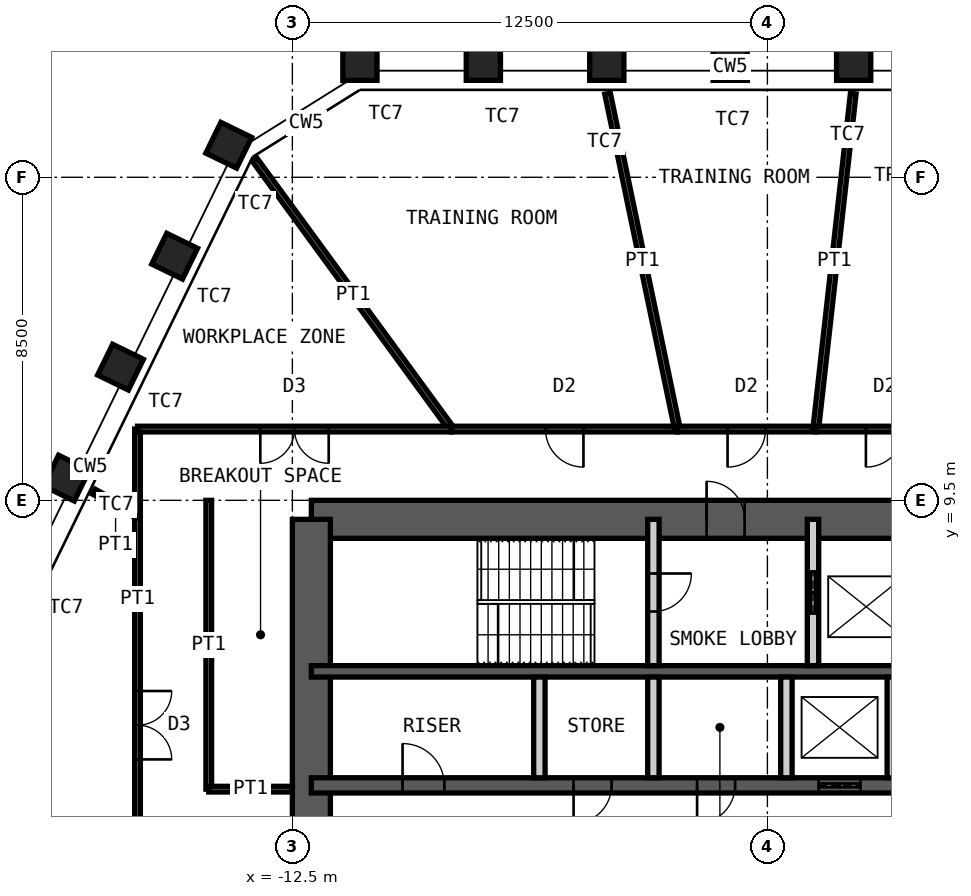
"""IFC4 building model, lengths in metres.
Left out: names, types, materials, properties, quantities, classifications, styles, units other than length and angle.
Written with IfcOpenShell. Run it as: python <this file> out.ifc"""

import sys

from ifc_helpers import new_model, si_unit, direction, frame, frame_2d, origin, origin_2d, place, context, subcontext, project, spatial, rectangle, hollow_rectangle, extrude, element, fill, save


model = new_model("IFC4")
c1 = context("Model", 3, precision=1e-05, world=origin(), true_north=direction((0.0, 1.0)))
c2 = subcontext(c1, "Body", "Model", "MODEL_VIEW")
j1 = project(units=[si_unit("LENGTHUNIT", "METRE"), si_unit("PLANEANGLEUNIT", "RADIAN")], contexts=[c1])
p1 = place(None, origin())
s1 = spatial("IfcSite", under=j1, at=p1, CompositionType="ELEMENT")
p2 = place(p1, origin())
s2 = spatial("IfcBuilding", under=s1, at=p2, CompositionType="ELEMENT")
p3 = place(p2, frame((0.0, 0.0, 283.0)))
s3 = spatial("IfcBuildingStorey", under=s2, at=p3, CompositionType="ELEMENT", Elevation=283.0)
for number, where, z_axis, x_axis in (
    (1, (-10.722, 21.0, 0.0), (0.0, 0.0, 1.0), (-1.0, 0.0, 0.0)),
    (2, (-7.474, 21.0, 0.0), (0.0, 0.0, 1.0), (-1.0, 0.0, 0.0)),
    (3, (-4.226, 21.0, 0.0), (0.0, 0.0, 1.0), (-1.0, 0.0, 0.0)),
    (4, (-0.978, 21.0, 0.0), (0.0, 0.0, 1.0), (-1.0, 0.0, 0.0)),
    (5, (2.27, 21.0, 0.0), (0.0, 0.0, 1.0), (-1.0, 0.0, 0.0)),
    (6, (-18.446, 10.085, 0.0), (0.0, 0.0, 1.0), (-0.438, -0.899, 0.0)),
    (7, (-17.022, 13.004, 0.0), (0.0, 0.0, 1.0), (-0.438, -0.899, 0.0)),
    (8, (-15.598, 15.924, 0.0), (0.0, 0.0, 1.0), (-0.438, -0.899, 0.0)),
    (9, (-14.174, 18.843, 0.0), (0.0, 0.0, 1.0), (-0.438, -0.899, 0.0)),
):
    element("IfcColumn", number, at=place(p3, frame(where, z_axis=z_axis, x_axis=x_axis)), inside=s3, PredefinedType="COLUMN", context=c2, shape_type="SweptSolid", body=[
        extrude(hollow_rectangle(XDim=0.9, YDim=0.9, WallThickness=0.06, at=origin_2d()), origin(), (0.0, 0.0, 1.0), 4.2),
    ])
p4 = place(p3, frame((-12.0, 9.0, 0.0), z_axis=(0.0, 0.0, 1.0), x_axis=(1.0, 0.0, 0.0)))
e10 = element("IfcWall", 10, at=p4, inside=s3, PredefinedType="SHEAR", context=c2, shape_type="SweptSolid", body=[
    extrude(rectangle(XDim=24.0, YDim=1.0, at=frame_2d((12.0, 0.0))), origin(), (0.0, 0.0, 1.0), 4.2),
])
p5 = place(p4, frame((10.4, 0.0, 0.0)))
e11 = element("IfcOpeningElement", 11, at=p5, cuts=e10, PredefinedType="OPENING", context=c2, shape_type="SweptSolid", body=[
    extrude(rectangle(XDim=1.0, YDim=2.1, at=frame_2d((0.5, 1.05))), frame((0.0, 0.51, 0.0), z_axis=(0.0, -1.0, 0.0), x_axis=(1.0, 0.0, 0.0)), (0.0, 0.0, 1.0), 1.02),
])
p6 = place(p4, frame((17.6, 0.0, 0.0)))
e12 = element("IfcOpeningElement", 12, at=p6, cuts=e10, PredefinedType="OPENING", context=c2, shape_type="SweptSolid", body=[
    extrude(rectangle(XDim=0.9, YDim=2.1, at=frame_2d((0.45, 1.05))), frame((0.0, 0.51, 0.0), z_axis=(0.0, -1.0, 0.0), x_axis=(1.0, 0.0, 0.0)), (0.0, 0.0, 1.0), 1.02),
])
p7 = place(p4, frame((21.9, 0.0, 0.0)))
e13 = element("IfcOpeningElement", 13, at=p7, cuts=e10, PredefinedType="OPENING", context=c2, shape_type="SweptSolid", body=[
    extrude(rectangle(XDim=0.9, YDim=2.1, at=frame_2d((0.45, 1.05))), frame((0.0, 0.51, 0.0), z_axis=(0.0, -1.0, 0.0), x_axis=(1.0, 0.0, 0.0)), (0.0, 0.0, 1.0), 1.02),
])
p8 = place(p3, frame((-12.0, -9.0, 0.0), z_axis=(0.0, 0.0, 1.0), x_axis=(0.0, 1.0, 0.0)))
e14 = element("IfcWall", 14, at=p8, inside=s3, PredefinedType="SHEAR", context=c2, shape_type="SweptSolid", body=[
    extrude(rectangle(XDim=18.0, YDim=1.0, at=frame_2d((9.0, 0.0))), origin(), (0.0, 0.0, 1.0), 4.2),
])
p9 = place(p8, frame((8.1, 0.0, 0.0)))
e15 = element("IfcOpeningElement", 15, at=p9, cuts=e14, PredefinedType="OPENING", context=c2, shape_type="SweptSolid", body=[
    extrude(rectangle(XDim=1.8, YDim=2.1, at=frame_2d((0.9, 1.05))), frame((0.0, 0.51, 0.0), z_axis=(0.0, -1.0, 0.0), x_axis=(1.0, 0.0, 0.0)), (0.0, 0.0, 1.0), 1.02),
])
p10 = place(p3, frame((-12.0, 5.0, 0.0), z_axis=(0.0, 0.0, 1.0), x_axis=(1.0, 0.0, 0.0)))
e16 = element("IfcWall", 16, at=p10, inside=s3, PredefinedType="SHEAR", context=c2, shape_type="SweptSolid", body=[
    extrude(rectangle(XDim=24.0, YDim=0.3, at=frame_2d((12.0, 0.0))), origin(), (0.0, 0.0, 1.0), 4.2),
])
p11 = place(p3, frame((-12.0, 2.0, 0.0), z_axis=(0.0, 0.0, 1.0), x_axis=(1.0, 0.0, 0.0)))
e17 = element("IfcWall", 17, at=p11, inside=s3, PredefinedType="SHEAR", context=c2, shape_type="SweptSolid", body=[
    extrude(rectangle(XDim=24.0, YDim=0.4, at=frame_2d((12.0, 0.0))), origin(), (0.0, 0.0, 1.0), 4.2),
])
p12 = place(p11, frame((2.4, 0.0, 0.0)))
e18 = element("IfcOpeningElement", 18, at=p12, cuts=e17, PredefinedType="OPENING", context=c2, shape_type="SweptSolid", body=[
    extrude(rectangle(XDim=1.1, YDim=2.1, at=frame_2d((0.55, 1.05))), frame((0.0, 0.21, 0.0), z_axis=(0.0, -1.0, 0.0), x_axis=(1.0, 0.0, 0.0)), (0.0, 0.0, 1.0), 0.42),
])
p13 = place(p11, frame((22.0, 0.0, 0.0)))
e19 = element("IfcOpeningElement", 19, at=p13, cuts=e17, PredefinedType="OPENING", context=c2, shape_type="SweptSolid", body=[
    extrude(rectangle(XDim=1.1, YDim=2.1, at=frame_2d((0.55, 1.05))), frame((0.0, 0.21, 0.0), z_axis=(0.0, -1.0, 0.0), x_axis=(1.0, 0.0, 0.0)), (0.0, 0.0, 1.0), 0.42),
])
p14 = place(p11, frame((10.15, 0.0, 0.0)))
e20 = element("IfcOpeningElement", 20, at=p14, cuts=e17, PredefinedType="OPENING", context=c2, shape_type="SweptSolid", body=[
    extrude(rectangle(XDim=1.0, YDim=2.1, at=frame_2d((0.5, 1.05))), frame((0.0, 0.21, 0.0), z_axis=(0.0, -1.0, 0.0), x_axis=(1.0, 0.0, 0.0)), (0.0, 0.0, 1.0), 0.42),
])
p15 = place(p11, frame((6.9, 0.0, 0.0)))
e21 = element("IfcOpeningElement", 21, at=p15, cuts=e17, PredefinedType="OPENING", context=c2, shape_type="SweptSolid", body=[
    extrude(rectangle(XDim=1.0, YDim=2.1, at=frame_2d((0.5, 1.05))), frame((0.0, 0.21, 0.0), z_axis=(0.0, -1.0, 0.0), x_axis=(1.0, 0.0, 0.0)), (0.0, 0.0, 1.0), 0.42),
])
p16 = place(p11, frame((13.35, 0.0, 0.0)))
e22 = element("IfcOpeningElement", 22, at=p16, cuts=e17, PredefinedType="OPENING", context=c2, shape_type="SweptSolid", body=[
    extrude(rectangle(XDim=1.1, YDim=2.4, at=frame_2d((0.55, 1.2))), frame((0.0, 0.21, 0.0), z_axis=(0.0, -1.0, 0.0), x_axis=(1.0, 0.0, 0.0)), (0.0, 0.0, 1.0), 0.42),
])
p17 = place(p11, frame((16.15, 0.0, 0.0)))
e23 = element("IfcOpeningElement", 23, at=p17, cuts=e17, PredefinedType="OPENING", context=c2, shape_type="SweptSolid", body=[
    extrude(rectangle(XDim=1.1, YDim=2.4, at=frame_2d((0.55, 1.2))), frame((0.0, 0.21, 0.0), z_axis=(0.0, -1.0, 0.0), x_axis=(1.0, 0.0, 0.0)), (0.0, 0.0, 1.0), 0.42),
])
p18 = place(p11, frame((19.0, 0.0, 0.0)))
e24 = element("IfcOpeningElement", 24, at=p18, cuts=e17, PredefinedType="OPENING", context=c2, shape_type="SweptSolid", body=[
    extrude(rectangle(XDim=1.0, YDim=2.1, at=frame_2d((0.5, 1.05))), frame((0.0, 0.21, 0.0), z_axis=(0.0, -1.0, 0.0), x_axis=(1.0, 0.0, 0.0)), (0.0, 0.0, 1.0), 0.42),
])
p19 = place(p3, frame((-3.0, 5.15, 0.0), z_axis=(0.0, 0.0, 1.0), x_axis=(0.0, 1.0, 0.0)))
e25 = element("IfcWall", 25, at=p19, inside=s3, PredefinedType="PARTITIONING", context=c2, shape_type="SweptSolid", body=[
    extrude(rectangle(XDim=3.85, YDim=0.3, at=frame_2d((1.925, 0.0))), origin(), (0.0, 0.0, 1.0), 3.98),
])
p20 = place(p19, frame((1.425, 0.0, 0.0)))
e26 = element("IfcOpeningElement", 26, at=p20, cuts=e25, PredefinedType="OPENING", context=c2, shape_type="SweptSolid", body=[
    extrude(rectangle(XDim=1.0, YDim=2.1, at=frame_2d((0.5, 1.05))), frame((0.0, 0.16, 0.0), z_axis=(0.0, -1.0, 0.0), x_axis=(1.0, 0.0, 0.0)), (0.0, 0.0, 1.0), 0.32),
])
p21 = place(p3, frame((1.2, 5.15, 0.0), z_axis=(0.0, 0.0, 1.0), x_axis=(0.0, 1.0, 0.0)))
e27 = element("IfcWall", 27, at=p21, inside=s3, PredefinedType="PARTITIONING", context=c2, shape_type="SweptSolid", body=[
    extrude(rectangle(XDim=3.85, YDim=0.3, at=frame_2d((1.925, 0.0))), origin(), (0.0, 0.0, 1.0), 3.98),
])
p22 = place(p21, frame((1.375, 0.0, 0.0)))
e28 = element("IfcOpeningElement", 28, at=p22, cuts=e27, PredefinedType="OPENING", context=c2, shape_type="SweptSolid", body=[
    extrude(rectangle(XDim=1.1, YDim=2.4, at=frame_2d((0.55, 1.2))), frame((0.0, 0.16, 0.0), z_axis=(0.0, -1.0, 0.0), x_axis=(1.0, 0.0, 0.0)), (0.0, 0.0, 1.0), 0.32),
])
for number, where, z_axis, x_axis in (
    (29, (-6.0, 2.2, 0.0), (0.0, 0.0, 1.0), (0.0, 1.0, 0.0)),
    (30, (-3.0, 2.2, 0.0), (0.0, 0.0, 1.0), (0.0, 1.0, 0.0)),
    (31, (0.5, 2.2, 0.0), (0.0, 0.0, 1.0), (0.0, 1.0, 0.0)),
    (32, (3.3, 2.2, 0.0), (0.0, 0.0, 1.0), (0.0, 1.0, 0.0)),
):
    element("IfcWall", number, at=place(p3, frame(where, z_axis=z_axis, x_axis=x_axis)), inside=s3, PredefinedType="PARTITIONING", context=c2, shape_type="SweptSolid", body=[
        extrude(rectangle(XDim=2.65, YDim=0.3, at=frame_2d((1.325, 0.0))), origin(), (0.0, 0.0, 1.0), 3.98),
    ])
p23 = place(p3, frame((-13.486, 18.455, 0.0), z_axis=(0.0, 0.0, 1.0), x_axis=(0.589997742419, -0.807404894672, 0.0)))
e33 = element("IfcWall", 33, at=p23, inside=s3, PredefinedType="PARTITIONING", context=c2, shape_type="SweptSolid", body=[
    extrude(rectangle(XDim=8.769, YDim=0.15, at=frame_2d((4.385, 0.0))), origin(), (0.0, 0.0, 1.0), 2.93),
])
p24 = place(p3, frame((-8.312, 11.375, 0.0), z_axis=(0.0, 0.0, 1.0), x_axis=(1.0, 0.0, 0.0)))
e34 = element("IfcWall", 34, at=p24, inside=s3, PredefinedType="PARTITIONING", context=c2, shape_type="SweptSolid", body=[
    extrude(rectangle(XDim=5.944, YDim=0.15, at=frame_2d((2.972, 0.0))), origin(), (0.0, 0.0, 1.0), 4.03),
])
p25 = place(p24, frame((2.472, 0.0, 0.0)))
e35 = element("IfcOpeningElement", 35, at=p25, cuts=e34, PredefinedType="OPENING", context=c2, shape_type="SweptSolid", body=[
    extrude(rectangle(XDim=1.0, YDim=2.4, at=frame_2d((0.5, 1.2))), frame((0.0, 0.085, 0.0), z_axis=(0.0, -1.0, 0.0), x_axis=(1.0, 0.0, 0.0)), (0.0, 0.0, 1.0), 0.17),
])
p26 = place(p3, frame((-4.206, 20.202, 0.0), z_axis=(0.0, 0.0, 1.0), x_axis=(0.203811521205, -0.979010144904, 0.0)))
e36 = element("IfcWall", 36, at=p26, inside=s3, PredefinedType="PARTITIONING", context=c2, shape_type="SweptSolid", body=[
    extrude(rectangle(XDim=9.016, YDim=0.15, at=frame_2d((4.508, 0.0))), origin(), (0.0, 0.0, 1.0), 3.33),
])
p27 = place(p3, frame((-2.368, 11.375, 0.0), z_axis=(0.0, 0.0, 1.0), x_axis=(1.0, 0.0, 0.0)))
e37 = element("IfcWall", 37, at=p27, inside=s3, PredefinedType="PARTITIONING", context=c2, shape_type="SweptSolid", body=[
    extrude(rectangle(XDim=3.64, YDim=0.15, at=frame_2d((1.82, 0.0))), origin(), (0.0, 0.0, 1.0), 4.03),
])
p28 = place(p27, frame((1.32, 0.0, 0.0)))
e38 = element("IfcOpeningElement", 38, at=p28, cuts=e37, PredefinedType="OPENING", context=c2, shape_type="SweptSolid", body=[
    extrude(rectangle(XDim=1.0, YDim=2.4, at=frame_2d((0.5, 1.2))), frame((0.0, 0.085, 0.0), z_axis=(0.0, -1.0, 0.0), x_axis=(1.0, 0.0, 0.0)), (0.0, 0.0, 1.0), 0.17),
])
p29 = place(p3, frame((2.259, 20.201, 0.0), z_axis=(0.0, 0.0, 1.0), x_axis=(-0.11111945026, -0.993807057619, 0.0)))
e39 = element("IfcWall", 39, at=p29, inside=s3, PredefinedType="PARTITIONING", context=c2, shape_type="SweptSolid", body=[
    extrude(rectangle(XDim=8.881, YDim=0.15, at=frame_2d((4.44, 0.0))), origin(), (0.0, 0.0, 1.0), 3.33),
])
p30 = place(p3, frame((1.272, 11.375, 0.0), z_axis=(0.0, 0.0, 1.0), x_axis=(1.0, 0.0, 0.0)))
e40 = element("IfcWall", 40, at=p30, inside=s3, PredefinedType="PARTITIONING", context=c2, shape_type="SweptSolid", body=[
    extrude(rectangle(XDim=3.64, YDim=0.15, at=frame_2d((1.82, 0.0))), origin(), (0.0, 0.0, 1.0), 4.03),
])
p31 = place(p30, frame((1.32, 0.0, 0.0)))
e41 = element("IfcOpeningElement", 41, at=p31, cuts=e40, PredefinedType="OPENING", context=c2, shape_type="SweptSolid", body=[
    extrude(rectangle(XDim=1.0, YDim=2.4, at=frame_2d((0.5, 1.2))), frame((0.0, 0.085, 0.0), z_axis=(0.0, -1.0, 0.0), x_axis=(1.0, 0.0, 0.0)), (0.0, 0.0, 1.0), 0.17),
])
p32 = place(p3, frame((-16.575, -1.931, 0.0), z_axis=(0.0, 0.0, 1.0), x_axis=(0.0, 1.0, 0.0)))
e42 = element("IfcWall", 42, at=p32, inside=s3, PredefinedType="PARTITIONING", context=c2, shape_type="SweptSolid", body=[
    extrude(rectangle(XDim=11.028, YDim=0.15, at=frame_2d((5.514, 0.0))), origin(), (0.0, 0.0, 1.0), 4.03),
])
p33 = place(p32, frame((4.614, 0.0, 0.0)))
e43 = element("IfcOpeningElement", 43, at=p33, cuts=e42, PredefinedType="OPENING", context=c2, shape_type="SweptSolid", body=[
    extrude(rectangle(XDim=1.8, YDim=2.4, at=frame_2d((0.9, 1.2))), frame((0.0, 0.085, 0.0), z_axis=(0.0, -1.0, 0.0), x_axis=(1.0, 0.0, 0.0)), (0.0, 0.0, 1.0), 0.17),
])
p34 = place(p3, frame((-17.729, 9.73, 0.0), z_axis=(0.0, 0.0, 1.0), x_axis=(0.87667364743, -0.481085559855, 0.0)))
e44 = element("IfcWall", 44, at=p34, inside=s3, PredefinedType="PARTITIONING", context=c2, shape_type="SweptSolid", body=[
    extrude(rectangle(XDim=1.316, YDim=0.15, at=frame_2d((0.658, 0.0))), origin(), (0.0, 0.0, 1.0), 3.33),
])
p35 = place(p3, frame((-16.575, 9.097, 0.0), z_axis=(0.0, 0.0, 1.0), x_axis=(0.0, 1.0, 0.0)))
e45 = element("IfcWall", 45, at=p35, inside=s3, PredefinedType="PARTITIONING", context=c2, shape_type="SweptSolid", body=[
    extrude(rectangle(XDim=2.278, YDim=0.15, at=frame_2d((1.139, 0.0))), origin(), (0.0, 0.0, 1.0), 4.03),
])
p36 = place(p3, frame((-16.575, 11.375, 0.0), z_axis=(0.0, 0.0, 1.0), x_axis=(1.0, 0.0, 0.0)))
e46 = element("IfcWall", 46, at=p36, inside=s3, PredefinedType="PARTITIONING", context=c2, shape_type="SweptSolid", body=[
    extrude(rectangle(XDim=8.263, YDim=0.15, at=frame_2d((4.131, 0.0))), origin(), (0.0, 0.0, 1.0), 4.03),
])
p37 = place(p36, frame((3.231, 0.0, 0.0)))
e47 = element("IfcOpeningElement", 47, at=p37, cuts=e46, PredefinedType="OPENING", context=c2, shape_type="SweptSolid", body=[
    extrude(rectangle(XDim=1.8, YDim=2.4, at=frame_2d((0.9, 1.2))), frame((0.0, 0.085, 0.0), z_axis=(0.0, -1.0, 0.0), x_axis=(1.0, 0.0, 0.0)), (0.0, 0.0, 1.0), 0.17),
])
p38 = place(p3, frame((-14.7, 1.9, 0.0), z_axis=(0.0, 0.0, 1.0), x_axis=(0.0, 1.0, 0.0)))
e48 = element("IfcWall", 48, at=p38, inside=s3, PredefinedType="PARTITIONING", context=c2, shape_type="SweptSolid", body=[
    extrude(rectangle(XDim=7.6, YDim=0.15, at=frame_2d((3.8, 0.0))), origin(), (0.0, 0.0, 1.0), 4.03),
])
p39 = place(p3, frame((-12.5, 1.9, 0.0), z_axis=(0.0, 0.0, 1.0), x_axis=(-1.0, 0.0, 0.0)))
e49 = element("IfcWall", 49, at=p39, inside=s3, PredefinedType="PARTITIONING", context=c2, shape_type="SweptSolid", body=[
    extrude(rectangle(XDim=2.2, YDim=0.15, at=frame_2d((1.1, 0.0))), origin(), (0.0, 0.0, 1.0), 3.53),
])
p40 = place(p5, origin())
e50 = element("IfcDoor", 50, at=p40, inside=s3, OperationType="SINGLE_SWING_RIGHT", PredefinedType="DOOR", context=c2, shape_type="SweptSolid", body=[
    extrude(rectangle(XDim=1.0, YDim=2.1, at=frame_2d((0.5, 1.05))), frame((0.0, 0.025, 0.0), z_axis=(0.0, -1.0, 0.0), x_axis=(1.0, 0.0, 0.0)), (0.0, 0.0, 1.0), 0.05),
])
fill(e11, e50)
p41 = place(p20, origin())
e51 = element("IfcDoor", 51, at=p41, inside=s3, OperationType="SINGLE_SWING_RIGHT", PredefinedType="DOOR", context=c2, shape_type="SweptSolid", body=[
    extrude(rectangle(XDim=1.0, YDim=2.1, at=frame_2d((0.5, 1.05))), frame((0.0, 0.025, 0.0), z_axis=(0.0, -1.0, 0.0), x_axis=(1.0, 0.0, 0.0)), (0.0, 0.0, 1.0), 0.05),
])
fill(e26, e51)
p42 = place(p12, origin())
e52 = element("IfcDoor", 52, at=p42, inside=s3, OperationType="SINGLE_SWING_RIGHT", PredefinedType="DOOR", context=c2, shape_type="SweptSolid", body=[
    extrude(rectangle(XDim=1.1, YDim=2.1, at=frame_2d((0.55, 1.05))), frame((0.0, 0.025, 0.0), z_axis=(0.0, -1.0, 0.0), x_axis=(1.0, 0.0, 0.0)), (0.0, 0.0, 1.0), 0.05),
])
fill(e18, e52)
p43 = place(p14, origin())
e53 = element("IfcDoor", 53, at=p43, inside=s3, OperationType="SINGLE_SWING_LEFT", PredefinedType="DOOR", context=c2, shape_type="SweptSolid", body=[
    extrude(rectangle(XDim=1.0, YDim=2.1, at=frame_2d((0.5, 1.05))), frame((0.0, 0.025, 0.0), z_axis=(0.0, -1.0, 0.0), x_axis=(1.0, 0.0, 0.0)), (0.0, 0.0, 1.0), 0.05),
])
fill(e20, e53)
p44 = place(p22, origin())
e54 = element("IfcDoor", 54, at=p44, inside=s3, OperationType="DOUBLE_DOOR_SLIDING", PredefinedType="DOOR", context=c2, shape_type="SweptSolid", body=[
    extrude(rectangle(XDim=1.1, YDim=2.4, at=frame_2d((0.55, 1.2))), frame((0.0, 0.025, 0.0), z_axis=(0.0, -1.0, 0.0), x_axis=(1.0, 0.0, 0.0)), (0.0, 0.0, 1.0), 0.05),
])
fill(e28, e54)
p45 = place(p15, origin())
e55 = element("IfcDoor", 55, at=p45, inside=s3, OperationType="SINGLE_SWING_LEFT", PredefinedType="DOOR", context=c2, shape_type="SweptSolid", body=[
    extrude(rectangle(XDim=1.0, YDim=2.1, at=frame_2d((0.5, 1.05))), frame((0.0, 0.025, 0.0), z_axis=(0.0, -1.0, 0.0), x_axis=(1.0, 0.0, 0.0)), (0.0, 0.0, 1.0), 0.05),
])
fill(e21, e55)
p46 = place(p16, origin())
e56 = element("IfcDoor", 56, at=p46, inside=s3, OperationType="DOUBLE_DOOR_SLIDING", PredefinedType="DOOR", context=c2, shape_type="SweptSolid", body=[
    extrude(rectangle(XDim=1.1, YDim=2.4, at=frame_2d((0.55, 1.2))), frame((0.0, 0.025, 0.0), z_axis=(0.0, -1.0, 0.0), x_axis=(1.0, 0.0, 0.0)), (0.0, 0.0, 1.0), 0.05),
])
fill(e22, e56)
p47 = place(p25, origin())
e57 = element("IfcDoor", 57, at=p47, inside=s3, OperationType="SINGLE_SWING_RIGHT", PredefinedType="DOOR", context=c2, shape_type="SweptSolid", body=[
    extrude(rectangle(XDim=1.0, YDim=2.4, at=frame_2d((0.5, 1.2))), frame((0.0, 0.025, 0.0), z_axis=(0.0, -1.0, 0.0), x_axis=(1.0, 0.0, 0.0)), (0.0, 0.0, 1.0), 0.05),
])
fill(e35, e57)
p48 = place(p28, origin())
e58 = element("IfcDoor", 58, at=p48, inside=s3, OperationType="SINGLE_SWING_LEFT", PredefinedType="DOOR", context=c2, shape_type="SweptSolid", body=[
    extrude(rectangle(XDim=1.0, YDim=2.4, at=frame_2d((0.5, 1.2))), frame((0.0, 0.025, 0.0), z_axis=(0.0, -1.0, 0.0), x_axis=(1.0, 0.0, 0.0)), (0.0, 0.0, 1.0), 0.05),
])
fill(e38, e58)
p49 = place(p31, origin())
e59 = element("IfcDoor", 59, at=p49, inside=s3, OperationType="SINGLE_SWING_LEFT", PredefinedType="DOOR", context=c2, shape_type="SweptSolid", body=[
    extrude(rectangle(XDim=1.0, YDim=2.4, at=frame_2d((0.5, 1.2))), frame((0.0, 0.025, 0.0), z_axis=(0.0, -1.0, 0.0), x_axis=(1.0, 0.0, 0.0)), (0.0, 0.0, 1.0), 0.05),
])
fill(e41, e59)
p50 = place(p33, origin())
e60 = element("IfcDoor", 60, at=p50, inside=s3, OperationType="DOUBLE_DOOR_DOUBLE_SWING", PredefinedType="DOOR", context=c2, shape_type="SweptSolid", body=[
    extrude(rectangle(XDim=1.8, YDim=2.4, at=frame_2d((0.9, 1.2))), frame((0.0, 0.025, 0.0), z_axis=(0.0, -1.0, 0.0), x_axis=(1.0, 0.0, 0.0)), (0.0, 0.0, 1.0), 0.05),
])
fill(e43, e60)
p51 = place(p37, origin())
e61 = element("IfcDoor", 61, at=p51, inside=s3, OperationType="DOUBLE_DOOR_DOUBLE_SWING", PredefinedType="DOOR", context=c2, shape_type="SweptSolid", body=[
    extrude(rectangle(XDim=1.8, YDim=2.4, at=frame_2d((0.9, 1.2))), frame((0.0, 0.025, 0.0), z_axis=(0.0, -1.0, 0.0), x_axis=(1.0, 0.0, 0.0)), (0.0, 0.0, 1.0), 0.05),
])
fill(e47, e61)
save(model, sys.argv[1])
